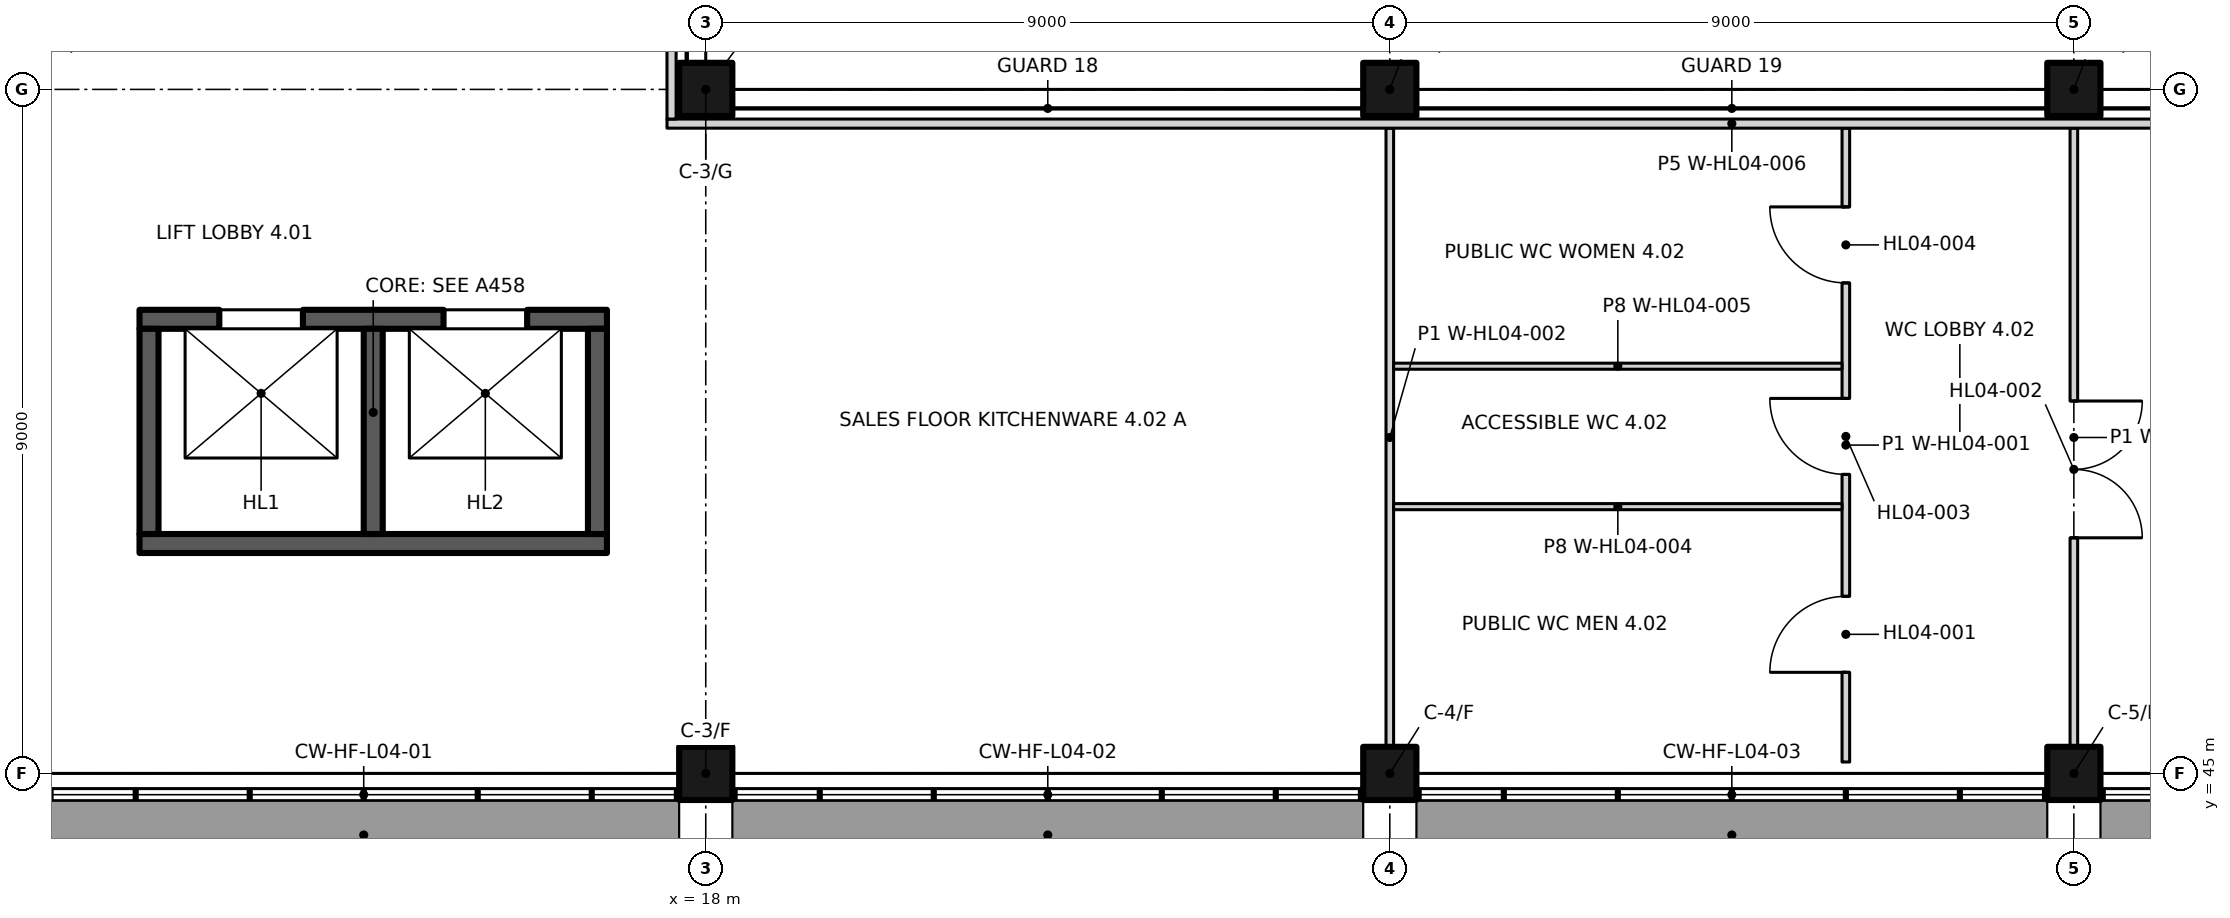
"""IFC4 building model, lengths in metres.
Left out: names, types, materials, properties, quantities, classifications, styles, units other than length and angle.
Written with IfcOpenShell. Run it as: python <this file> out.ifc"""

import sys

from ifc_helpers import new_model, si_unit, direction, frame, frame_2d, origin, origin_2d, place, context, subcontext, project, spatial, rectangle, extrude, element, fill, save


model = new_model("IFC4")
c1 = context("Model", 3, precision=1e-05, world=origin(), true_north=direction((0.0, 1.0)))
c2 = subcontext(c1, "Body", "Model", "MODEL_VIEW")
j1 = project(units=[si_unit("LENGTHUNIT", "METRE"), si_unit("PLANEANGLEUNIT", "RADIAN")], contexts=[c1])
p1 = place(None, origin())
s1 = spatial("IfcSite", under=j1, at=p1, CompositionType="ELEMENT")
p2 = place(p1, origin())
s2 = spatial("IfcBuilding", under=s1, at=p2, CompositionType="ELEMENT")
p3 = place(p2, frame((0.0, 0.0, 19.5)))
s3 = spatial("IfcBuildingStorey", under=s2, at=p3, CompositionType="ELEMENT", Elevation=19.5)
for number, where, z_axis, x_axis in (
    (1, (18.0, 45.0, 0.0), (0.0, 0.0, 1.0), (1.0, 0.0, 0.0)),
    (2, (27.0, 45.0, 0.0), (0.0, 0.0, 1.0), (1.0, 0.0, 0.0)),
    (3, (36.0, 45.0, 0.0), (0.0, 0.0, 1.0), (1.0, 0.0, 0.0)),
    (4, (18.0, 54.0, 0.0), (0.0, 0.0, 1.0), (1.0, 0.0, 0.0)),
    (5, (27.0, 54.0, 0.0), (0.0, 0.0, 1.0), (1.0, 0.0, 0.0)),
    (6, (36.0, 54.0, 0.0), (0.0, 0.0, 1.0), (1.0, 0.0, 0.0)),
):
    element("IfcColumn", number, at=place(p3, frame(where, z_axis=z_axis, x_axis=x_axis)), inside=s3, PredefinedType="COLUMN", context=c2, shape_type="SweptSolid", body=[
        extrude(rectangle(XDim=0.7, YDim=0.7, at=origin_2d()), origin(), (0.0, 0.0, 1.0), 4.5),
    ])
p4 = place(p3, frame((10.55, 50.975, 0.0), z_axis=(0.0, 0.0, 1.0), x_axis=(1.0, 0.0, 0.0)))
e7 = element("IfcWall", 7, at=p4, inside=s3, PredefinedType="SHEAR", context=c2, shape_type="SweptSolid", body=[
    extrude(rectangle(XDim=6.15, YDim=0.25, at=frame_2d((3.075, 0.0))), origin(), (0.0, 0.0, 1.0), 4.5),
])
p5 = place(p4, frame((1.05, 0.0, 0.0)))
e8 = element("IfcOpeningElement", 8, at=p5, cuts=e7, PredefinedType="OPENING", context=c2, shape_type="SweptSolid", body=[
    extrude(rectangle(XDim=1.1, YDim=2.1, at=frame_2d((0.55, 1.05))), frame((0.0, 0.135, 0.0), z_axis=(0.0, -1.0, 0.0), x_axis=(1.0, 0.0, 0.0)), (0.0, 0.0, 1.0), 0.27),
])
p6 = place(p4, frame((4.0, 0.0, 0.0)))
e9 = element("IfcOpeningElement", 9, at=p6, cuts=e7, PredefinedType="OPENING", context=c2, shape_type="SweptSolid", body=[
    extrude(rectangle(XDim=1.1, YDim=2.1, at=frame_2d((0.55, 1.05))), frame((0.0, 0.135, 0.0), z_axis=(0.0, -1.0, 0.0), x_axis=(1.0, 0.0, 0.0)), (0.0, 0.0, 1.0), 0.27),
])
p7 = place(p3, frame((10.55, 48.025, 0.0), z_axis=(0.0, 0.0, 1.0), x_axis=(1.0, 0.0, 0.0)))
e10 = element("IfcWall", 10, at=p7, inside=s3, PredefinedType="SHEAR", context=c2, shape_type="SweptSolid", body=[
    extrude(rectangle(XDim=6.15, YDim=0.25, at=frame_2d((3.075, 0.0))), origin(), (0.0, 0.0, 1.0), 4.5),
])
for number, where, z_axis, x_axis in (
    (11, (10.675, 48.15, 0.0), (0.0, 0.0, 1.0), (0.0, 1.0, 0.0)),
    (12, (13.625, 48.15, 0.0), (0.0, 0.0, 1.0), (0.0, 1.0, 0.0)),
    (13, (16.575, 48.15, 0.0), (0.0, 0.0, 1.0), (0.0, 1.0, 0.0)),
):
    element("IfcWall", number, at=place(p3, frame(where, z_axis=z_axis, x_axis=x_axis)), inside=s3, PredefinedType="SHEAR", context=c2, shape_type="SweptSolid", body=[
        extrude(rectangle(XDim=2.7, YDim=0.25, at=frame_2d((1.35, 0.0))), origin(), (0.0, 0.0, 1.0), 4.5),
    ])
p8 = place(p3, frame((33.0, 45.15, 0.0), z_axis=(0.0, 0.0, 1.0), x_axis=(0.0, 1.0, 0.0)))
e14 = element("IfcWall", 14, at=p8, inside=s3, PredefinedType="PARTITIONING", context=c2, shape_type="SweptSolid", body=[
    extrude(rectangle(XDim=8.34, YDim=0.1, at=frame_2d((4.17, 0.0))), origin(), (0.0, 0.0, 1.0), 3.7),
])
p9 = place(p8, frame((1.18, 0.0, 0.0)))
e15 = element("IfcOpeningElement", 15, at=p9, cuts=e14, PredefinedType="OPENING", context=c2, shape_type="SweptSolid", body=[
    extrude(rectangle(XDim=1.0, YDim=2.1, at=frame_2d((0.5, 1.05))), frame((0.0, 0.06, 0.0), z_axis=(0.0, -1.0, 0.0), x_axis=(1.0, 0.0, 0.0)), (0.0, 0.0, 1.0), 0.12),
])
p10 = place(p8, frame((3.784, 0.0, 0.0)))
e16 = element("IfcOpeningElement", 16, at=p10, cuts=e14, PredefinedType="OPENING", context=c2, shape_type="SweptSolid", body=[
    extrude(rectangle(XDim=1.0, YDim=2.1, at=frame_2d((0.5, 1.05))), frame((0.0, 0.06, 0.0), z_axis=(0.0, -1.0, 0.0), x_axis=(1.0, 0.0, 0.0)), (0.0, 0.0, 1.0), 0.12),
])
p11 = place(p8, frame((6.304, 0.0, 0.0)))
e17 = element("IfcOpeningElement", 17, at=p11, cuts=e14, PredefinedType="OPENING", context=c2, shape_type="SweptSolid", body=[
    extrude(rectangle(XDim=1.0, YDim=2.1, at=frame_2d((0.5, 1.05))), frame((0.0, 0.06, 0.0), z_axis=(0.0, -1.0, 0.0), x_axis=(1.0, 0.0, 0.0)), (0.0, 0.0, 1.0), 0.12),
])
p12 = place(p3, frame((27.0, 45.35, 0.0), z_axis=(0.0, 0.0, 1.0), x_axis=(0.0, 1.0, 0.0)))
e18 = element("IfcWall", 18, at=p12, inside=s3, PredefinedType="PARTITIONING", context=c2, shape_type="SweptSolid", body=[
    extrude(rectangle(XDim=8.14, YDim=0.1, at=frame_2d((4.07, 0.0))), origin(), (0.0, 0.0, 1.0), 4.2),
])
p13 = place(p3, frame((36.0, 45.35, 0.0), z_axis=(0.0, 0.0, 1.0), x_axis=(0.0, 1.0, 0.0)))
e19 = element("IfcWall", 19, at=p13, inside=s3, PredefinedType="PARTITIONING", context=c2, shape_type="SweptSolid", body=[
    extrude(rectangle(XDim=8.14, YDim=0.1, at=frame_2d((4.07, 0.0))), origin(), (0.0, 0.0, 1.0), 4.2),
])
p14 = place(p13, frame((4.55, 0.0, 0.0), z_axis=(0.0, 0.0, 1.0), x_axis=(-1.0, 0.0, 0.0)))
e20 = element("IfcOpeningElement", 20, at=p14, cuts=e19, PredefinedType="OPENING", context=c2, shape_type="SweptSolid", body=[
    extrude(rectangle(XDim=1.8, YDim=2.1, at=frame_2d((0.9, 1.05))), frame((0.0, 0.06, 0.0), z_axis=(0.0, -1.0, 0.0), x_axis=(1.0, 0.0, 0.0)), (0.0, 0.0, 1.0), 0.12),
])
for number, where, z_axis, x_axis in (
    (21, (27.05, 48.51, 0.0), (0.0, 0.0, 1.0), (1.0, 0.0, 0.0)),
    (22, (27.05, 50.358, 0.0), (0.0, 0.0, 1.0), (1.0, 0.0, 0.0)),
):
    element("IfcWall", number, at=place(p3, frame(where, z_axis=z_axis, x_axis=x_axis)), inside=s3, PredefinedType="PARTITIONING", context=c2, shape_type="SweptSolid", body=[
        extrude(rectangle(XDim=5.9, YDim=0.08, at=frame_2d((2.95, 0.0))), origin(), (0.0, 0.0, 1.0), 4.2),
    ])
p15 = place(p3, frame((17.49, 53.55, 0.0), z_axis=(0.0, 0.0, 1.0), x_axis=(1.0, 0.0, 0.0)))
e23 = element("IfcWall", 23, at=p15, inside=s3, PredefinedType="PARTITIONING", context=c2, shape_type="SweptSolid", body=[
    extrude(rectangle(XDim=28.02, YDim=0.12, at=frame_2d((14.01, 0.0))), origin(), (0.0, 0.0, 1.0), 3.7),
])
p16 = place(p3, frame((17.55, 53.61, 0.0), z_axis=(0.0, 0.0, 1.0), x_axis=(0.0, 1.0, 0.0)))
e24 = element("IfcWall", 24, at=p16, inside=s3, PredefinedType="PARTITIONING", context=c2, shape_type="SweptSolid", body=[
    extrude(rectangle(XDim=36.515, YDim=0.12, at=frame_2d((18.257, 0.0))), origin(), (0.0, 0.0, 1.0), 3.7),
])
p17 = place(p5, origin())
e25 = element("IfcDoor", 25, at=p17, inside=s3, OperationType="DOUBLE_DOOR_SLIDING", PredefinedType="DOOR", context=c2, shape_type="SweptSolid", body=[
    extrude(rectangle(XDim=1.1, YDim=2.1, at=frame_2d((0.55, 1.05))), frame((0.0, 0.025, 0.0), z_axis=(0.0, -1.0, 0.0), x_axis=(1.0, 0.0, 0.0)), (0.0, 0.0, 1.0), 0.05),
])
fill(e8, e25)
p18 = place(p6, origin())
e26 = element("IfcDoor", 26, at=p18, inside=s3, OperationType="DOUBLE_DOOR_SLIDING", PredefinedType="DOOR", context=c2, shape_type="SweptSolid", body=[
    extrude(rectangle(XDim=1.1, YDim=2.1, at=frame_2d((0.55, 1.05))), frame((0.0, 0.025, 0.0), z_axis=(0.0, -1.0, 0.0), x_axis=(1.0, 0.0, 0.0)), (0.0, 0.0, 1.0), 0.05),
])
fill(e9, e26)
p19 = place(p9, origin())
e27 = element("IfcDoor", 27, at=p19, inside=s3, OperationType="SINGLE_SWING_LEFT", PredefinedType="DOOR", context=c2, shape_type="SweptSolid", body=[
    extrude(rectangle(XDim=1.0, YDim=2.1, at=frame_2d((0.5, 1.05))), frame((0.0, 0.025, 0.0), z_axis=(0.0, -1.0, 0.0), x_axis=(1.0, 0.0, 0.0)), (0.0, 0.0, 1.0), 0.05),
])
fill(e15, e27)
p20 = place(p14, origin())
e28 = element("IfcDoor", 28, at=p20, inside=s3, OperationType="DOUBLE_DOOR_SINGLE_SWING", PredefinedType="DOOR", context=c2, shape_type="SweptSolid", body=[
    extrude(rectangle(XDim=1.8, YDim=2.1, at=frame_2d((0.9, 1.05))), frame((0.0, 0.025, 0.0), z_axis=(0.0, -1.0, 0.0), x_axis=(1.0, 0.0, 0.0)), (0.0, 0.0, 1.0), 0.05),
])
fill(e20, e28)
p21 = place(p10, origin())
e29 = element("IfcDoor", 29, at=p21, inside=s3, OperationType="SINGLE_SWING_RIGHT", PredefinedType="DOOR", context=c2, shape_type="SweptSolid", body=[
    extrude(rectangle(XDim=1.0, YDim=2.1, at=frame_2d((0.5, 1.05))), frame((0.0, 0.025, 0.0), z_axis=(0.0, -1.0, 0.0), x_axis=(1.0, 0.0, 0.0)), (0.0, 0.0, 1.0), 0.05),
])
fill(e16, e29)
p22 = place(p11, origin())
e30 = element("IfcDoor", 30, at=p22, inside=s3, OperationType="SINGLE_SWING_RIGHT", PredefinedType="DOOR", context=c2, shape_type="SweptSolid", body=[
    extrude(rectangle(XDim=1.0, YDim=2.1, at=frame_2d((0.5, 1.05))), frame((0.0, 0.025, 0.0), z_axis=(0.0, -1.0, 0.0), x_axis=(1.0, 0.0, 0.0)), (0.0, 0.0, 1.0), 0.05),
])
fill(e17, e30)
save(model, sys.argv[1])
